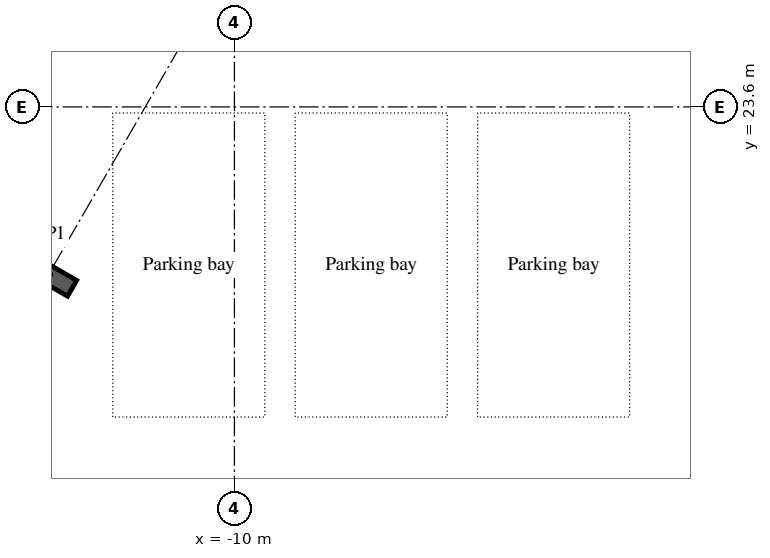
"""IFC4 building model, lengths in metres.
Left out: names, types, materials, properties, quantities, classifications, styles, units other than length and angle.
Written with IfcOpenShell. Run it as: python <this file> out.ifc"""

import sys

from ifc_helpers import new_model, si_unit, direction, frame, origin, origin_2d, place, context, subcontext, project, spatial, i_section, extrude, element, save


model = new_model("IFC4")
c1 = context("Model", 3, precision=1e-05, world=origin(), true_north=direction((0.0, 1.0)))
c2 = subcontext(c1, "Body", "Model", "MODEL_VIEW")
j1 = project(units=[si_unit("LENGTHUNIT", "METRE"), si_unit("PLANEANGLEUNIT", "RADIAN")], contexts=[c1])
p1 = place(None, origin())
s1 = spatial("IfcSite", under=j1, at=p1, CompositionType="ELEMENT")
p2 = place(p1, origin())
s2 = spatial("IfcBuilding", under=s1, at=p2, CompositionType="ELEMENT")
p3 = place(p2, frame((0.0, 0.0, -8.4)))
s3 = spatial("IfcBuildingStorey", under=s2, at=p3, CompositionType="ELEMENT", Elevation=-8.4)
p4 = place(p3, frame((-13.059, 20.842, 0.0), z_axis=(0.0, 0.0, 1.0), x_axis=(0.50000017485, 0.866025302835, 0.0)))
e1 = element("IfcColumn", 1, at=p4, inside=s3, PredefinedType="COLUMN", context=c2, shape_type="SweptSolid", body=[
    extrude(i_section(OverallWidth=0.3, OverallDepth=0.9, WebThickness=0.019, FlangeThickness=0.035, FilletRadius=0.03, at=origin_2d()), origin(), (0.0, 0.0, 1.0), 3.82),
])
save(model, sys.argv[1])
